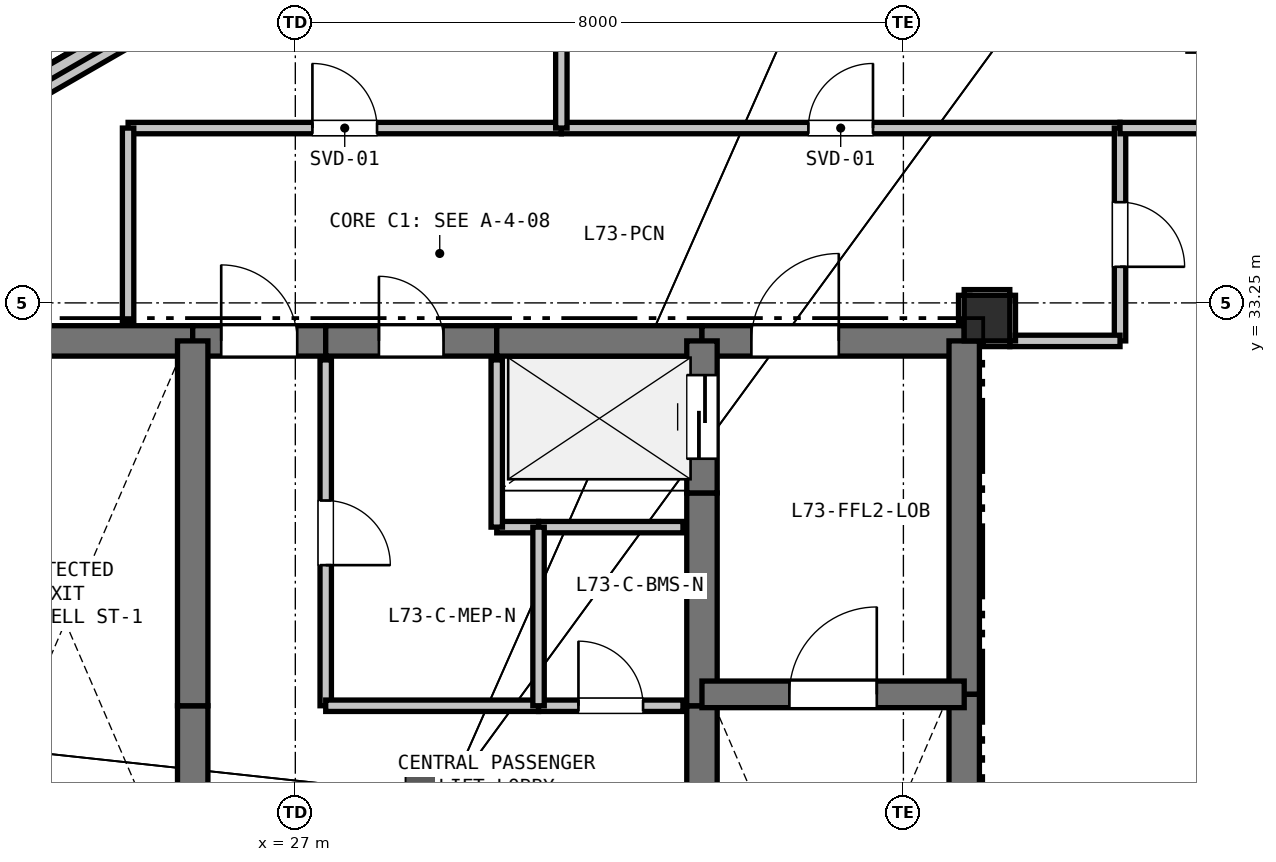
"""IFC4 building model, lengths in metres.
Left out: names, types, materials, properties, quantities, classifications, styles, units other than length and angle.
Written with IfcOpenShell. Run it as: python <this file> out.ifc"""

import sys

from ifc_helpers import new_model, si_unit, direction, frame, frame_2d, origin, origin_2d, place, context, subcontext, project, spatial, rectangle, extrude, element, fill, save


model = new_model("IFC4")
c1 = context("Model", 3, precision=1e-05, world=origin(), true_north=direction((0.0, 1.0)))
c2 = subcontext(c1, "Body", "Model", "MODEL_VIEW")
j1 = project(units=[si_unit("LENGTHUNIT", "METRE"), si_unit("PLANEANGLEUNIT", "RADIAN")], contexts=[c1])
p1 = place(None, origin())
s1 = spatial("IfcSite", under=j1, at=p1, CompositionType="ELEMENT")
p2 = place(p1, origin())
s2 = spatial("IfcBuilding", under=s1, at=p2, CompositionType="ELEMENT")
p3 = place(p2, frame((0.0, 0.0, 264.0)))
s3 = spatial("IfcBuildingStorey", under=s2, at=p3, CompositionType="ELEMENT", Elevation=264.0)
p4 = place(p3, frame((36.1, 33.05, 0.0), z_axis=(0.0, 0.0, 1.0), x_axis=(1.0, 0.0, 0.0)))
e1 = element("IfcColumn", 1, at=p4, inside=s3, PredefinedType="COLUMN", context=c2, shape_type="SweptSolid", body=[
    extrude(rectangle(XDim=0.6, YDim=0.6, at=origin_2d()), origin(), (0.0, 0.0, 1.0), 2.6),
])
p5 = place(p3, frame((10.732, 28.608, 0.0), z_axis=(0.0, 0.0, 1.0), x_axis=(0.866023553042, 0.500003205566, 0.0)))
e2 = element("IfcWall", 2, at=p5, inside=s3, PredefinedType="SOLIDWALL", context=c2, shape_type="SweptSolid", body=[
    extrude(rectangle(XDim=29.783, YDim=0.225, at=frame_2d((14.892, 0.0))), origin(), (0.0, 0.0, 1.0), 2.25),
])
p6 = place(p3, frame((10.602, 28.683, 2.7), z_axis=(0.0, 0.0, 1.0), x_axis=(0.866024093284, 0.500002269847, 0.0)))
e3 = element("IfcWall", 3, at=p6, inside=s3, PredefinedType="PARAPET", context=c2, shape_type="SweptSolid", body=[
    extrude(rectangle(XDim=29.933, YDim=0.175, at=frame_2d((14.967, 0.0))), origin(), (0.0, 0.0, 1.0), 1.2),
])
p7 = place(p3, frame((22.2, 32.75, 0.0), z_axis=(0.0, 0.0, 1.0), x_axis=(1.0, 0.0, 0.0)))
e4 = element("IfcWall", 4, at=p7, inside=s3, PredefinedType="SHEAR", context=c2, shape_type="SweptSolid", body=[
    extrude(rectangle(XDim=3.45, YDim=0.4, at=frame_2d((1.725, 0.0))), origin(), (0.0, 0.0, 1.0), 2.6),
])
p8 = place(p3, frame((25.65, 32.75, 0.0), z_axis=(0.0, 0.0, 1.0), x_axis=(1.0, 0.0, 0.0)))
e5 = element("IfcWall", 5, at=p8, inside=s3, PredefinedType="SHEAR", context=c2, shape_type="SweptSolid", body=[
    extrude(rectangle(XDim=1.75, YDim=0.4, at=frame_2d((0.875, 0.0))), origin(), (0.0, 0.0, 1.0), 2.6),
])
p9 = place(p8, frame((0.375, 0.0, 0.0)))
e6 = element("IfcOpeningElement", 6, at=p9, cuts=e5, PredefinedType="OPENING", context=c2, shape_type="SweptSolid", body=[
    extrude(rectangle(XDim=1.0, YDim=2.15, at=frame_2d((0.5, 1.075))), frame((0.0, 0.21, 0.0), z_axis=(0.0, -1.0, 0.0), x_axis=(1.0, 0.0, 0.0)), (0.0, 0.0, 1.0), 0.42),
])
p10 = place(p3, frame((27.4, 32.75, 0.0), z_axis=(0.0, 0.0, 1.0), x_axis=(1.0, 0.0, 0.0)))
e7 = element("IfcWall", 7, at=p10, inside=s3, PredefinedType="SHEAR", context=c2, shape_type="SweptSolid", body=[
    extrude(rectangle(XDim=2.25, YDim=0.4, at=frame_2d((1.125, 0.0))), origin(), (0.0, 0.0, 1.0), 2.6),
])
p11 = place(p10, frame((0.7, 0.0, 0.0)))
e8 = element("IfcOpeningElement", 8, at=p11, cuts=e7, PredefinedType="OPENING", context=c2, shape_type="SweptSolid", body=[
    extrude(rectangle(XDim=0.85, YDim=2.1, at=frame_2d((0.425, 1.05))), frame((0.0, 0.21, 0.0), z_axis=(0.0, -1.0, 0.0), x_axis=(1.0, 0.0, 0.0)), (0.0, 0.0, 1.0), 0.42),
])
p12 = place(p3, frame((29.65, 32.75, 0.0), z_axis=(0.0, 0.0, 1.0), x_axis=(1.0, 0.0, 0.0)))
e9 = element("IfcWall", 9, at=p12, inside=s3, PredefinedType="SHEAR", context=c2, shape_type="SweptSolid", body=[
    extrude(rectangle(XDim=2.7, YDim=0.4, at=frame_2d((1.35, 0.0))), origin(), (0.0, 0.0, 1.0), 2.6),
])
p13 = place(p3, frame((32.35, 32.75, 0.0), z_axis=(0.0, 0.0, 1.0), x_axis=(1.0, 0.0, 0.0)))
e10 = element("IfcWall", 10, at=p13, inside=s3, PredefinedType="SHEAR", context=c2, shape_type="SweptSolid", body=[
    extrude(rectangle(XDim=3.45, YDim=0.4, at=frame_2d((1.725, 0.0))), origin(), (0.0, 0.0, 1.0), 2.6),
])
p14 = place(p13, frame((0.65, 0.0, 0.0)))
e11 = element("IfcOpeningElement", 11, at=p14, cuts=e10, PredefinedType="OPENING", context=c2, shape_type="SweptSolid", body=[
    extrude(rectangle(XDim=1.15, YDim=2.15, at=frame_2d((0.575, 1.075))), frame((0.0, 0.21, 0.0), z_axis=(0.0, -1.0, 0.0), x_axis=(1.0, 0.0, 0.0)), (0.0, 0.0, 1.0), 0.42),
])
p15 = place(p3, frame((35.8, 32.75, 0.0), z_axis=(0.0, 0.0, 1.0), x_axis=(0.0, -1.0, 0.0)))
e12 = element("IfcWall", 12, at=p15, inside=s3, PredefinedType="SHEAR", context=c2, shape_type="SweptSolid", body=[
    extrude(rectangle(XDim=4.65, YDim=0.4, at=frame_2d((2.325, 0.0))), origin(), (0.0, 0.0, 1.0), 2.6),
])
p16 = place(p3, frame((35.8, 28.1, 0.0), z_axis=(0.0, 0.0, 1.0), x_axis=(0.0, -1.0, 0.0)))
e13 = element("IfcWall", 13, at=p16, inside=s3, PredefinedType="SHEAR", context=c2, shape_type="SweptSolid", body=[
    extrude(rectangle(XDim=7.35, YDim=0.4, at=frame_2d((3.675, 0.0))), origin(), (0.0, 0.0, 1.0), 2.6),
])
p17 = place(p3, frame((25.65, 25.55, 0.0), z_axis=(0.0, 0.0, 1.0), x_axis=(0.0, 1.0, 0.0)))
e14 = element("IfcWall", 14, at=p17, inside=s3, PredefinedType="SHEAR", context=c2, shape_type="SweptSolid", body=[
    extrude(rectangle(XDim=2.4, YDim=0.4, at=frame_2d((1.2, 0.0))), origin(), (0.0, 0.0, 1.0), 2.6),
])
p18 = place(p3, frame((25.65, 27.95, 0.0), z_axis=(0.0, 0.0, 1.0), x_axis=(0.0, 1.0, 0.0)))
e15 = element("IfcWall", 15, at=p18, inside=s3, PredefinedType="SHEAR", context=c2, shape_type="SweptSolid", body=[
    extrude(rectangle(XDim=4.8, YDim=0.4, at=frame_2d((2.4, 0.0))), origin(), (0.0, 0.0, 1.0), 2.6),
])
p19 = place(p3, frame((32.35, 25.55, 0.0), z_axis=(0.0, 0.0, 1.0), x_axis=(0.0, 1.0, 0.0)))
e16 = element("IfcWall", 16, at=p19, inside=s3, PredefinedType="SHEAR", context=c2, shape_type="SweptSolid", body=[
    extrude(rectangle(XDim=2.4, YDim=0.4, at=frame_2d((1.2, 0.0))), origin(), (0.0, 0.0, 1.0), 2.6),
])
p20 = place(p3, frame((32.35, 27.95, 0.0), z_axis=(0.0, 0.0, 1.0), x_axis=(0.0, 1.0, 0.0)))
e17 = element("IfcWall", 17, at=p20, inside=s3, PredefinedType="SHEAR", context=c2, shape_type="SweptSolid", body=[
    extrude(rectangle(XDim=2.8, YDim=0.4, at=frame_2d((1.4, 0.0))), origin(), (0.0, 0.0, 1.0), 2.6),
])
p21 = place(p3, frame((32.35, 30.75, 0.0), z_axis=(0.0, 0.0, 1.0), x_axis=(0.0, 1.0, 0.0)))
e18 = element("IfcWall", 18, at=p21, inside=s3, PredefinedType="SHEAR", context=c2, shape_type="SweptSolid", body=[
    extrude(rectangle(XDim=2.0, YDim=0.4, at=frame_2d((1.0, 0.0))), origin(), (0.0, 0.0, 1.0), 2.6),
])
p22 = place(p21, frame((0.45, 0.0, 0.0)))
e19 = element("IfcOpeningElement", 19, at=p22, cuts=e18, PredefinedType="OPENING", context=c2, shape_type="SweptSolid", body=[
    extrude(rectangle(XDim=1.1, YDim=2.15, at=frame_2d((0.55, 1.075))), frame((0.0, 0.21, 0.0), z_axis=(0.0, -1.0, 0.0), x_axis=(1.0, 0.0, 0.0)), (0.0, 0.0, 1.0), 0.42),
])
p23 = place(p3, frame((32.35, 28.1, 0.0), z_axis=(0.0, 0.0, 1.0), x_axis=(1.0, 0.0, 0.0)))
e20 = element("IfcWall", 20, at=p23, inside=s3, PredefinedType="SHEAR", context=c2, shape_type="SweptSolid", body=[
    extrude(rectangle(XDim=3.45, YDim=0.35, at=frame_2d((1.725, 0.0))), origin(), (0.0, 0.0, 1.0), 2.6),
])
p24 = place(p23, frame((1.15, 0.0, 0.0)))
e21 = element("IfcOpeningElement", 21, at=p24, cuts=e20, PredefinedType="OPENING", context=c2, shape_type="SweptSolid", body=[
    extrude(rectangle(XDim=1.15, YDim=2.15, at=frame_2d((0.575, 1.075))), frame((0.0, 0.185, 0.0), z_axis=(0.0, -1.0, 0.0), x_axis=(1.0, 0.0, 0.0)), (0.0, 0.0, 1.0), 0.37),
])
p25 = place(p3, frame((32.1, 30.3, 0.0), z_axis=(0.0, 0.0, 1.0), x_axis=(-1.0, 0.0, 0.0)))
e22 = element("IfcWall", 22, at=p25, inside=s3, PredefinedType="PARTITIONING", context=c2, shape_type="SweptSolid", body=[
    extrude(rectangle(XDim=1.9, YDim=0.15, at=frame_2d((0.95, 0.0))), origin(), (0.0, 0.0, 1.0), 2.6),
])
p26 = place(p3, frame((30.2, 30.3, 0.0), z_axis=(0.0, 0.0, 1.0), x_axis=(-1.0, 0.0, 0.0)))
e23 = element("IfcWall", 23, at=p26, inside=s3, PredefinedType="PARTITIONING", context=c2, shape_type="SweptSolid", body=[
    extrude(rectangle(XDim=0.55, YDim=0.15, at=frame_2d((0.275, 0.0))), origin(), (0.0, 0.0, 1.0), 2.6),
])
p27 = place(p3, frame((29.65, 30.3, 0.0), z_axis=(0.0, 0.0, 1.0), x_axis=(0.0, 1.0, 0.0)))
e24 = element("IfcWall", 24, at=p27, inside=s3, PredefinedType="PARTITIONING", context=c2, shape_type="SweptSolid", body=[
    extrude(rectangle(XDim=2.2, YDim=0.15, at=frame_2d((1.1, 0.0))), origin(), (0.0, 0.0, 1.0), 2.6),
])
p28 = place(p3, frame((27.4, 32.5, 0.0), z_axis=(0.0, 0.0, 1.0), x_axis=(0.0, -1.0, 0.0)))
e25 = element("IfcWall", 25, at=p28, inside=s3, PredefinedType="PARTITIONING", context=c2, shape_type="SweptSolid", body=[
    extrude(rectangle(XDim=4.55, YDim=0.15, at=frame_2d((2.275, 0.0))), origin(), (0.0, 0.0, 1.0), 2.6),
])
p29 = place(p28, frame((1.85, 0.0, 0.0)))
e26 = element("IfcOpeningElement", 26, at=p29, cuts=e25, PredefinedType="OPENING", context=c2, shape_type="SweptSolid", body=[
    extrude(rectangle(XDim=0.85, YDim=2.1, at=frame_2d((0.425, 1.05))), frame((0.0, 0.085, 0.0), z_axis=(0.0, -1.0, 0.0), x_axis=(1.0, 0.0, 0.0)), (0.0, 0.0, 1.0), 0.17),
])
p30 = place(p3, frame((27.4, 27.95, 0.0), z_axis=(0.0, 0.0, 1.0), x_axis=(1.0, 0.0, 0.0)))
e27 = element("IfcWall", 27, at=p30, inside=s3, PredefinedType="PARTITIONING", context=c2, shape_type="SweptSolid", body=[
    extrude(rectangle(XDim=2.8, YDim=0.15, at=frame_2d((1.4, 0.0))), origin(), (0.0, 0.0, 1.0), 2.6),
])
p31 = place(p3, frame((30.2, 27.95, 0.0), z_axis=(0.0, 0.0, 1.0), x_axis=(1.0, 0.0, 0.0)))
e28 = element("IfcWall", 28, at=p31, inside=s3, PredefinedType="PARTITIONING", context=c2, shape_type="SweptSolid", body=[
    extrude(rectangle(XDim=1.9, YDim=0.15, at=frame_2d((0.95, 0.0))), origin(), (0.0, 0.0, 1.0), 2.6),
])
p32 = place(p31, frame((0.525, 0.0, 0.0)))
e29 = element("IfcOpeningElement", 29, at=p32, cuts=e28, PredefinedType="OPENING", context=c2, shape_type="SweptSolid", body=[
    extrude(rectangle(XDim=0.85, YDim=2.1, at=frame_2d((0.425, 1.05))), frame((0.0, 0.085, 0.0), z_axis=(0.0, -1.0, 0.0), x_axis=(1.0, 0.0, 0.0)), (0.0, 0.0, 1.0), 0.17),
])
p33 = place(p3, frame((24.8, 35.55, 0.0), z_axis=(0.0, 0.0, 1.0), x_axis=(1.0, 0.0, 0.0)))
e30 = element("IfcWall", 30, at=p33, inside=s3, PredefinedType="PARTITIONING", context=c2, shape_type="SweptSolid", body=[
    extrude(rectangle(XDim=5.7, YDim=0.15, at=frame_2d((2.85, 0.0))), origin(), (0.0, 0.0, 1.0), 2.6),
])
p34 = place(p33, frame((2.425, 0.0, 0.0)))
e31 = element("IfcOpeningElement", 31, at=p34, cuts=e30, PredefinedType="OPENING", context=c2, shape_type="SweptSolid", body=[
    extrude(rectangle(XDim=0.85, YDim=2.1, at=frame_2d((0.425, 1.05))), frame((0.0, 0.085, 0.0), z_axis=(0.0, -1.0, 0.0), x_axis=(1.0, 0.0, 0.0)), (0.0, 0.0, 1.0), 0.17),
])
p35 = place(p3, frame((30.5, 35.55, 0.0), z_axis=(0.0, 0.0, 1.0), x_axis=(1.0, 0.0, 0.0)))
e32 = element("IfcWall", 32, at=p35, inside=s3, PredefinedType="PARTITIONING", context=c2, shape_type="SweptSolid", body=[
    extrude(rectangle(XDim=7.35, YDim=0.15, at=frame_2d((3.675, 0.0))), origin(), (0.0, 0.0, 1.0), 2.6),
])
p36 = place(p35, frame((3.25, 0.0, 0.0)))
e33 = element("IfcOpeningElement", 33, at=p36, cuts=e32, PredefinedType="OPENING", context=c2, shape_type="SweptSolid", body=[
    extrude(rectangle(XDim=0.85, YDim=2.1, at=frame_2d((0.425, 1.05))), frame((0.0, 0.085, 0.0), z_axis=(0.0, -1.0, 0.0), x_axis=(1.0, 0.0, 0.0)), (0.0, 0.0, 1.0), 0.17),
])
p37 = place(p3, frame((37.85, 35.55, 0.0), z_axis=(0.0, 0.0, 1.0), x_axis=(0.0, -1.0, 0.0)))
e34 = element("IfcWall", 34, at=p37, inside=s3, PredefinedType="PARTITIONING", context=c2, shape_type="SweptSolid", body=[
    extrude(rectangle(XDim=2.8, YDim=0.15, at=frame_2d((1.4, 0.0))), origin(), (0.0, 0.0, 1.0), 2.6),
])
p38 = place(p37, frame((0.975, 0.0, 0.0)))
e35 = element("IfcOpeningElement", 35, at=p38, cuts=e34, PredefinedType="OPENING", context=c2, shape_type="SweptSolid", body=[
    extrude(rectangle(XDim=0.85, YDim=2.1, at=frame_2d((0.425, 1.05))), frame((0.0, 0.085, 0.0), z_axis=(0.0, -1.0, 0.0), x_axis=(1.0, 0.0, 0.0)), (0.0, 0.0, 1.0), 0.17),
])
p39 = place(p3, frame((37.85, 32.75, 0.0), z_axis=(0.0, 0.0, 1.0), x_axis=(-1.0, 0.0, 0.0)))
e36 = element("IfcWall", 36, at=p39, inside=s3, PredefinedType="PARTITIONING", context=c2, shape_type="SweptSolid", body=[
    extrude(rectangle(XDim=1.45, YDim=0.15, at=frame_2d((0.725, 0.0))), origin(), (0.0, 0.0, 1.0), 2.6),
])
p40 = place(p3, frame((36.4, 32.75, 0.0), z_axis=(0.0, 0.0, 1.0), x_axis=(0.0, 1.0, 0.0)))
e37 = element("IfcWall", 37, at=p40, inside=s3, PredefinedType="PARTITIONING", context=c2, shape_type="SweptSolid", body=[
    extrude(rectangle(XDim=0.6, YDim=0.15, at=frame_2d((0.3, 0.0))), origin(), (0.0, 0.0, 1.0), 2.6),
])
p41 = place(p3, frame((36.4, 33.35, 0.0), z_axis=(0.0, 0.0, 1.0), x_axis=(-1.0, 0.0, 0.0)))
e38 = element("IfcWall", 38, at=p41, inside=s3, PredefinedType="PARTITIONING", context=c2, shape_type="SweptSolid", body=[
    extrude(rectangle(XDim=0.6, YDim=0.15, at=frame_2d((0.3, 0.0))), origin(), (0.0, 0.0, 1.0), 2.6),
])
p42 = place(p3, frame((35.8, 33.35, 0.0), z_axis=(0.0, 0.0, 1.0), x_axis=(0.0, -1.0, 0.0)))
e39 = element("IfcWall", 39, at=p42, inside=s3, PredefinedType="PARTITIONING", context=c2, shape_type="SweptSolid", body=[
    extrude(rectangle(XDim=0.35, YDim=0.15, at=frame_2d((0.175, 0.0))), origin(), (0.0, 0.0, 1.0), 2.6),
])
p43 = place(p3, frame((24.8, 33.0, 0.0), z_axis=(0.0, 0.0, 1.0), x_axis=(0.0, 1.0, 0.0)))
e40 = element("IfcWall", 40, at=p43, inside=s3, PredefinedType="PARTITIONING", context=c2, shape_type="SweptSolid", body=[
    extrude(rectangle(XDim=2.55, YDim=0.15, at=frame_2d((1.275, 0.0))), origin(), (0.0, 0.0, 1.0), 2.6),
])
p44 = place(p3, frame((30.2, 30.3, 0.0), z_axis=(0.0, 0.0, 1.0), x_axis=(0.0, -1.0, 0.0)))
e41 = element("IfcWall", 41, at=p44, inside=s3, PredefinedType="PARTITIONING", context=c2, shape_type="SweptSolid", body=[
    extrude(rectangle(XDim=2.35, YDim=0.15, at=frame_2d((1.175, 0.0))), origin(), (0.0, 0.0, 1.0), 2.6),
])
p45 = place(p3, frame((39.606, 35.55, 0.0), z_axis=(0.0, 0.0, 1.0), x_axis=(-1.0, 0.0, 0.0)))
e42 = element("IfcWall", 42, at=p45, inside=s3, PredefinedType="PARTITIONING", context=c2, shape_type="SweptSolid", body=[
    extrude(rectangle(XDim=1.756, YDim=0.15, at=frame_2d((0.878, 0.0))), origin(), (0.0, 0.0, 1.0), 2.105),
])
p46 = place(p3, frame((30.5, 35.55, 0.0), z_axis=(0.0, 0.0, 1.0), x_axis=(0.0, 1.0, 0.0)))
e43 = element("IfcWall", 43, at=p46, inside=s3, PredefinedType="PARTITIONING", context=c2, shape_type="SweptSolid", body=[
    extrude(rectangle(XDim=4.313, YDim=0.15, at=frame_2d((2.156, 0.0))), origin(), (0.0, 0.0, 1.0), 2.105),
])
p47 = place(p3, frame((36.05, 32.75, 0.0), z_axis=(0.0, 0.0, 1.0), x_axis=(1.0, 0.0, 0.0)))
e44 = element("IfcWall", 44, at=p47, inside=s3, PredefinedType="PARTITIONING", context=c2, shape_type="SweptSolid", body=[
    extrude(rectangle(XDim=0.35, YDim=0.15, at=frame_2d((0.175, 0.0))), origin(), (0.0, 0.0, 1.0), 2.6),
])
p48 = place(p9, origin())
e45 = element("IfcDoor", 45, at=p48, inside=s3, OperationType="SINGLE_SWING_LEFT", PredefinedType="DOOR", context=c2, shape_type="SweptSolid", body=[
    extrude(rectangle(XDim=1.0, YDim=2.15, at=frame_2d((0.5, 1.075))), frame((0.0, 0.025, 0.0), z_axis=(0.0, -1.0, 0.0), x_axis=(1.0, 0.0, 0.0)), (0.0, 0.0, 1.0), 0.05),
])
fill(e6, e45)
p49 = place(p22, origin())
e46 = element("IfcDoor", 46, at=p49, inside=s3, OperationType="SLIDING_TO_LEFT", PredefinedType="DOOR", context=c2, shape_type="SweptSolid", body=[
    extrude(rectangle(XDim=1.1, YDim=2.15, at=frame_2d((0.55, 1.075))), frame((0.0, 0.025, 0.0), z_axis=(0.0, -1.0, 0.0), x_axis=(1.0, 0.0, 0.0)), (0.0, 0.0, 1.0), 0.05),
])
fill(e19, e46)
p50 = place(p24, origin())
e47 = element("IfcDoor", 47, at=p50, inside=s3, OperationType="SINGLE_SWING_RIGHT", PredefinedType="DOOR", context=c2, shape_type="SweptSolid", body=[
    extrude(rectangle(XDim=1.15, YDim=2.15, at=frame_2d((0.575, 1.075))), frame((0.0, 0.025, 0.0), z_axis=(0.0, -1.0, 0.0), x_axis=(1.0, 0.0, 0.0)), (0.0, 0.0, 1.0), 0.05),
])
fill(e21, e47)
p51 = place(p14, origin())
e48 = element("IfcDoor", 48, at=p51, inside=s3, OperationType="SINGLE_SWING_RIGHT", PredefinedType="DOOR", context=c2, shape_type="SweptSolid", body=[
    extrude(rectangle(XDim=1.15, YDim=2.15, at=frame_2d((0.575, 1.075))), frame((0.0, 0.025, 0.0), z_axis=(0.0, -1.0, 0.0), x_axis=(1.0, 0.0, 0.0)), (0.0, 0.0, 1.0), 0.05),
])
fill(e11, e48)
p52 = place(p29, origin())
e49 = element("IfcDoor", 49, at=p52, inside=s3, OperationType="SINGLE_SWING_RIGHT", PredefinedType="DOOR", context=c2, shape_type="SweptSolid", body=[
    extrude(rectangle(XDim=0.85, YDim=2.1, at=frame_2d((0.425, 1.05))), frame((0.0, 0.025, 0.0), z_axis=(0.0, -1.0, 0.0), x_axis=(1.0, 0.0, 0.0)), (0.0, 0.0, 1.0), 0.05),
])
fill(e26, e49)
p53 = place(p32, origin())
e50 = element("IfcDoor", 50, at=p53, inside=s3, OperationType="SINGLE_SWING_LEFT", PredefinedType="DOOR", context=c2, shape_type="SweptSolid", body=[
    extrude(rectangle(XDim=0.85, YDim=2.1, at=frame_2d((0.425, 1.05))), frame((0.0, 0.025, 0.0), z_axis=(0.0, -1.0, 0.0), x_axis=(1.0, 0.0, 0.0)), (0.0, 0.0, 1.0), 0.05),
])
fill(e29, e50)
p54 = place(p11, origin())
e51 = element("IfcDoor", 51, at=p54, inside=s3, OperationType="SINGLE_SWING_LEFT", PredefinedType="DOOR", context=c2, shape_type="SweptSolid", body=[
    extrude(rectangle(XDim=0.85, YDim=2.1, at=frame_2d((0.425, 1.05))), frame((0.0, 0.025, 0.0), z_axis=(0.0, -1.0, 0.0), x_axis=(1.0, 0.0, 0.0)), (0.0, 0.0, 1.0), 0.05),
])
fill(e8, e51)
p55 = place(p36, origin())
e52 = element("IfcDoor", 52, at=p55, inside=s3, OperationType="SINGLE_SWING_RIGHT", PredefinedType="DOOR", context=c2, shape_type="SweptSolid", body=[
    extrude(rectangle(XDim=0.85, YDim=2.1, at=frame_2d((0.425, 1.05))), frame((0.0, 0.025, 0.0), z_axis=(0.0, -1.0, 0.0), x_axis=(1.0, 0.0, 0.0)), (0.0, 0.0, 1.0), 0.05),
])
fill(e33, e52)
p56 = place(p34, origin())
e53 = element("IfcDoor", 53, at=p56, inside=s3, OperationType="SINGLE_SWING_LEFT", PredefinedType="DOOR", context=c2, shape_type="SweptSolid", body=[
    extrude(rectangle(XDim=0.85, YDim=2.1, at=frame_2d((0.425, 1.05))), frame((0.0, 0.025, 0.0), z_axis=(0.0, -1.0, 0.0), x_axis=(1.0, 0.0, 0.0)), (0.0, 0.0, 1.0), 0.05),
])
fill(e31, e53)
p57 = place(p38, origin())
e54 = element("IfcDoor", 54, at=p57, inside=s3, OperationType="SINGLE_SWING_RIGHT", PredefinedType="DOOR", context=c2, shape_type="SweptSolid", body=[
    extrude(rectangle(XDim=0.85, YDim=2.1, at=frame_2d((0.425, 1.05))), frame((0.0, 0.025, 0.0), z_axis=(0.0, -1.0, 0.0), x_axis=(1.0, 0.0, 0.0)), (0.0, 0.0, 1.0), 0.05),
])
fill(e35, e54)
save(model, sys.argv[1])
